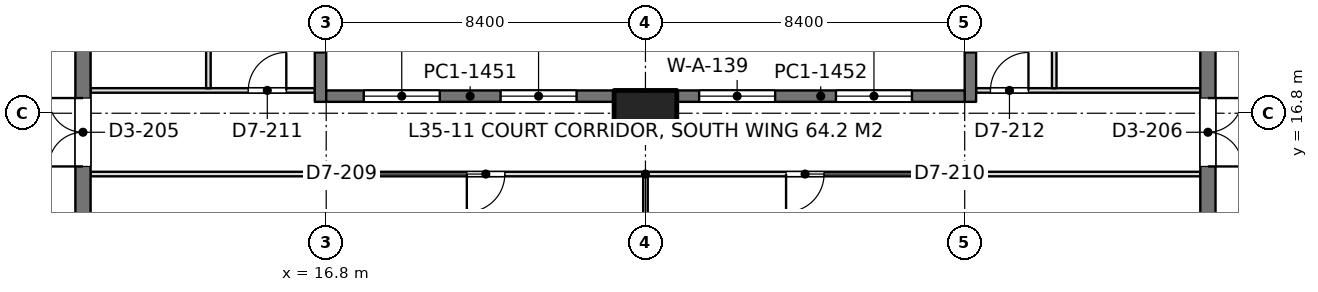
"""IFC4 building model, lengths in metres.
Left out: names, types, materials, properties, quantities, classifications, styles, units other than length and angle.
Written with IfcOpenShell. Run it as: python <this file> out.ifc"""

import sys

from ifc_helpers import new_model, si_unit, direction, frame, frame_2d, origin, origin_2d, place, context, subcontext, project, spatial, rectangle, extrude, element, fill, save


model = new_model("IFC4")
c1 = context("Model", 3, precision=1e-05, world=origin(), true_north=direction((0.0, 1.0)))
c2 = subcontext(c1, "Body", "Model", "MODEL_VIEW")
j1 = project(units=[si_unit("LENGTHUNIT", "METRE"), si_unit("PLANEANGLEUNIT", "RADIAN")], contexts=[c1])
p1 = place(None, origin())
s1 = spatial("IfcSite", under=j1, at=p1, CompositionType="ELEMENT")
p2 = place(p1, origin())
s2 = spatial("IfcBuilding", under=s1, at=p2, CompositionType="ELEMENT")
p3 = place(p2, frame((0.0, 0.0, 155.4)))
s3 = spatial("IfcBuildingStorey", under=s2, at=p3, CompositionType="ELEMENT", Elevation=155.4)
p4 = place(p3, frame((25.2, 16.8, 0.0), z_axis=(0.0, 0.0, 1.0), x_axis=(1.0, 0.0, 0.0)))
e1 = element("IfcColumn", 1, at=p4, inside=s3, PredefinedType="COLUMN", context=c2, shape_type="SweptSolid", body=[
    extrude(rectangle(XDim=1.65, YDim=1.2, at=origin_2d()), origin(), (0.0, 0.0, 1.0), 4.2),
])
p5 = place(p3, frame((10.4, 13.05, 0.0), z_axis=(0.0, 0.0, 1.0), x_axis=(0.0, 1.0, 0.0)))
e2 = element("IfcWall", 2, at=p5, inside=s3, PredefinedType="SHEAR", context=c2, shape_type="SweptSolid", body=[
    extrude(rectangle(XDim=24.3, YDim=0.4, at=frame_2d((12.15, 0.0))), origin(), (0.0, 0.0, 1.0), 4.2),
])
p6 = place(p5, frame((10.05, 0.0, 0.0)))
e3 = element("IfcOpeningElement", 3, at=p6, cuts=e2, PredefinedType="OPENING", context=c2, shape_type="SweptSolid", body=[
    extrude(rectangle(XDim=1.1, YDim=2.2, at=frame_2d((0.55, 1.1))), frame((0.0, 0.21, 0.0), z_axis=(0.0, -1.0, 0.0), x_axis=(1.0, 0.0, 0.0)), (0.0, 0.0, 1.0), 0.42),
])
p7 = place(p5, frame((12.9, 0.0, 0.0)))
e4 = element("IfcOpeningElement", 4, at=p7, cuts=e2, PredefinedType="OPENING", context=c2, shape_type="SweptSolid", body=[
    extrude(rectangle(XDim=1.1, YDim=2.2, at=frame_2d((0.55, 1.1))), frame((0.0, 0.21, 0.0), z_axis=(0.0, -1.0, 0.0), x_axis=(1.0, 0.0, 0.0)), (0.0, 0.0, 1.0), 0.42),
])
p8 = place(p5, frame((21.45, 0.0, 0.0)))
e5 = element("IfcOpeningElement", 5, at=p8, cuts=e2, PredefinedType="OPENING", context=c2, shape_type="SweptSolid", body=[
    extrude(rectangle(XDim=1.1, YDim=2.2, at=frame_2d((0.55, 1.1))), frame((0.0, 0.21, 0.0), z_axis=(0.0, -1.0, 0.0), x_axis=(1.0, 0.0, 0.0)), (0.0, 0.0, 1.0), 0.42),
])
p9 = place(p5, frame((2.35, 0.0, 0.0)))
e6 = element("IfcOpeningElement", 6, at=p9, cuts=e2, PredefinedType="OPENING", context=c2, shape_type="SweptSolid", body=[
    extrude(rectangle(XDim=1.8, YDim=2.4, at=frame_2d((0.9, 1.2))), frame((0.0, 0.21, 0.0), z_axis=(0.0, -1.0, 0.0), x_axis=(1.0, 0.0, 0.0)), (0.0, 0.0, 1.0), 0.42),
])
p10 = place(p5, frame((5.8, 0.0, 0.0)))
e7 = element("IfcOpeningElement", 7, at=p10, cuts=e2, PredefinedType="OPENING", context=c2, shape_type="SweptSolid", body=[
    extrude(rectangle(XDim=1.8, YDim=2.4, at=frame_2d((0.9, 1.2))), frame((0.0, 0.21, 0.0), z_axis=(0.0, -1.0, 0.0), x_axis=(1.0, 0.0, 0.0)), (0.0, 0.0, 1.0), 0.42),
])
p11 = place(p3, frame((40.0, 13.05, 0.0), z_axis=(0.0, 0.0, 1.0), x_axis=(0.0, 1.0, 0.0)))
e8 = element("IfcWall", 8, at=p11, inside=s3, PredefinedType="SHEAR", context=c2, shape_type="SweptSolid", body=[
    extrude(rectangle(XDim=24.3, YDim=0.4, at=frame_2d((12.15, 0.0))), origin(), (0.0, 0.0, 1.0), 4.2),
])
p12 = place(p11, frame((10.05, 0.0, 0.0)))
e9 = element("IfcOpeningElement", 9, at=p12, cuts=e8, PredefinedType="OPENING", context=c2, shape_type="SweptSolid", body=[
    extrude(rectangle(XDim=1.1, YDim=2.2, at=frame_2d((0.55, 1.1))), frame((0.0, 0.21, 0.0), z_axis=(0.0, -1.0, 0.0), x_axis=(1.0, 0.0, 0.0)), (0.0, 0.0, 1.0), 0.42),
])
p13 = place(p11, frame((12.9, 0.0, 0.0)))
e10 = element("IfcOpeningElement", 10, at=p13, cuts=e8, PredefinedType="OPENING", context=c2, shape_type="SweptSolid", body=[
    extrude(rectangle(XDim=1.1, YDim=2.2, at=frame_2d((0.55, 1.1))), frame((0.0, 0.21, 0.0), z_axis=(0.0, -1.0, 0.0), x_axis=(1.0, 0.0, 0.0)), (0.0, 0.0, 1.0), 0.42),
])
p14 = place(p11, frame((21.45, 0.0, 0.0)))
e11 = element("IfcOpeningElement", 11, at=p14, cuts=e8, PredefinedType="OPENING", context=c2, shape_type="SweptSolid", body=[
    extrude(rectangle(XDim=1.1, YDim=2.2, at=frame_2d((0.55, 1.1))), frame((0.0, 0.21, 0.0), z_axis=(0.0, -1.0, 0.0), x_axis=(1.0, 0.0, 0.0)), (0.0, 0.0, 1.0), 0.42),
])
p15 = place(p11, frame((2.35, 0.0, 0.0)))
e12 = element("IfcOpeningElement", 12, at=p15, cuts=e8, PredefinedType="OPENING", context=c2, shape_type="SweptSolid", body=[
    extrude(rectangle(XDim=1.8, YDim=2.4, at=frame_2d((0.9, 1.2))), frame((0.0, 0.21, 0.0), z_axis=(0.0, -1.0, 0.0), x_axis=(1.0, 0.0, 0.0)), (0.0, 0.0, 1.0), 0.42),
])
p16 = place(p11, frame((5.8, 0.0, 0.0)))
e13 = element("IfcOpeningElement", 13, at=p16, cuts=e8, PredefinedType="OPENING", context=c2, shape_type="SweptSolid", body=[
    extrude(rectangle(XDim=1.8, YDim=2.4, at=frame_2d((0.9, 1.2))), frame((0.0, 0.21, 0.0), z_axis=(0.0, -1.0, 0.0), x_axis=(1.0, 0.0, 0.0)), (0.0, 0.0, 1.0), 0.42),
])
p17 = place(p3, frame((16.65, 17.1, 0.0), z_axis=(0.0, 0.0, 1.0), x_axis=(0.0, 1.0, 0.0)))
e14 = element("IfcWall", 14, at=p17, inside=s3, PredefinedType="SOLIDWALL", context=c2, shape_type="SweptSolid", body=[
    extrude(rectangle(XDim=5.0, YDim=0.3, at=frame_2d((2.5, 0.0))), origin(), (0.0, 0.0, 1.0), 4.05),
])
p18 = place(p17, frame((1.3, 0.0, 0.1)))
e15 = element("IfcOpeningElement", 15, at=p18, cuts=e14, PredefinedType="OPENING", context=c2, shape_type="SweptSolid", body=[
    extrude(rectangle(XDim=2.0, YDim=3.0, at=frame_2d((1.0, 1.5))), frame((0.0, 0.16, 0.0), z_axis=(0.0, -1.0, 0.0), x_axis=(1.0, 0.0, 0.0)), (0.0, 0.0, 1.0), 0.32),
])
p19 = place(p3, frame((33.75, 17.1, 0.0), z_axis=(0.0, 0.0, 1.0), x_axis=(0.0, 1.0, 0.0)))
e16 = element("IfcWall", 16, at=p19, inside=s3, PredefinedType="SOLIDWALL", context=c2, shape_type="SweptSolid", body=[
    extrude(rectangle(XDim=5.0, YDim=0.3, at=frame_2d((2.5, 0.0))), origin(), (0.0, 0.0, 1.0), 4.05),
])
p20 = place(p19, frame((1.3, 0.0, 0.1)))
e17 = element("IfcOpeningElement", 17, at=p20, cuts=e16, PredefinedType="OPENING", context=c2, shape_type="SweptSolid", body=[
    extrude(rectangle(XDim=2.0, YDim=3.0, at=frame_2d((1.0, 1.5))), frame((0.0, 0.16, 0.0), z_axis=(0.0, -1.0, 0.0), x_axis=(1.0, 0.0, 0.0)), (0.0, 0.0, 1.0), 0.32),
])
p21 = place(p3, frame((16.8, 17.25, 0.0), z_axis=(0.0, 0.0, 1.0), x_axis=(1.0, 0.0, 0.0)))
e18 = element("IfcWall", 18, at=p21, inside=s3, PredefinedType="SOLIDWALL", context=c2, shape_type="SweptSolid", body=[
    extrude(rectangle(XDim=7.575, YDim=0.3, at=frame_2d((3.788, 0.0))), origin(), (0.0, 0.0, 1.0), 4.05),
])
p22 = place(p21, frame((0.988, 0.0, 0.1)))
e19 = element("IfcOpeningElement", 19, at=p22, cuts=e18, PredefinedType="OPENING", context=c2, shape_type="SweptSolid", body=[
    extrude(rectangle(XDim=2.0, YDim=3.0, at=frame_2d((1.0, 1.5))), frame((0.0, 0.16, 0.0), z_axis=(0.0, -1.0, 0.0), x_axis=(1.0, 0.0, 0.0)), (0.0, 0.0, 1.0), 0.32),
])
p23 = place(p21, frame((4.587, 0.0, 0.1)))
e20 = element("IfcOpeningElement", 20, at=p23, cuts=e18, PredefinedType="OPENING", context=c2, shape_type="SweptSolid", body=[
    extrude(rectangle(XDim=2.0, YDim=3.0, at=frame_2d((1.0, 1.5))), frame((0.0, 0.16, 0.0), z_axis=(0.0, -1.0, 0.0), x_axis=(1.0, 0.0, 0.0)), (0.0, 0.0, 1.0), 0.32),
])
p24 = place(p3, frame((26.025, 17.25, 0.0), z_axis=(0.0, 0.0, 1.0), x_axis=(1.0, 0.0, 0.0)))
e21 = element("IfcWall", 21, at=p24, inside=s3, PredefinedType="SOLIDWALL", context=c2, shape_type="SweptSolid", body=[
    extrude(rectangle(XDim=7.575, YDim=0.3, at=frame_2d((3.788, 0.0))), origin(), (0.0, 0.0, 1.0), 4.05),
])
p25 = place(p24, frame((0.587, 0.0, 0.1)))
e22 = element("IfcOpeningElement", 22, at=p25, cuts=e21, PredefinedType="OPENING", context=c2, shape_type="SweptSolid", body=[
    extrude(rectangle(XDim=2.0, YDim=3.0, at=frame_2d((1.0, 1.5))), frame((0.0, 0.16, 0.0), z_axis=(0.0, -1.0, 0.0), x_axis=(1.0, 0.0, 0.0)), (0.0, 0.0, 1.0), 0.32),
])
p26 = place(p24, frame((4.188, 0.0, 0.1)))
e23 = element("IfcOpeningElement", 23, at=p26, cuts=e21, PredefinedType="OPENING", context=c2, shape_type="SweptSolid", body=[
    extrude(rectangle(XDim=2.0, YDim=3.0, at=frame_2d((1.0, 1.5))), frame((0.0, 0.16, 0.0), z_axis=(0.0, -1.0, 0.0), x_axis=(1.0, 0.0, 0.0)), (0.0, 0.0, 1.0), 0.32),
])
p27 = place(p3, frame((10.598, 17.4, 0.0), z_axis=(0.0, 0.0, 1.0), x_axis=(1.0, 0.0, 0.0)))
e24 = element("IfcWall", 24, at=p27, inside=s3, PredefinedType="PARTITIONING", context=c2, shape_type="SweptSolid", body=[
    extrude(rectangle(XDim=5.904, YDim=0.12, at=frame_2d((2.952, 0.0))), origin(), (0.0, 0.0, 1.0), 3.55),
])
p28 = place(p27, frame((4.152, 0.0, 0.0)))
e25 = element("IfcOpeningElement", 25, at=p28, cuts=e24, PredefinedType="OPENING", context=c2, shape_type="SweptSolid", body=[
    extrude(rectangle(XDim=1.0, YDim=2.4, at=frame_2d((0.5, 1.2))), frame((0.0, 0.07, 0.0), z_axis=(0.0, -1.0, 0.0), x_axis=(1.0, 0.0, 0.0)), (0.0, 0.0, 1.0), 0.14),
])
p29 = place(p3, frame((13.7, 17.458, 0.0), z_axis=(0.0, 0.0, 1.0), x_axis=(0.0, 1.0, 0.0)))
e26 = element("IfcWall", 26, at=p29, inside=s3, PredefinedType="PARTITIONING", context=c2, shape_type="SweptSolid", body=[
    extrude(rectangle(XDim=4.644, YDim=0.12, at=frame_2d((2.322, 0.0))), origin(), (0.0, 0.0, 1.0), 3.6),
])
p30 = place(p3, frame((33.898, 17.4, 0.0), z_axis=(0.0, 0.0, 1.0), x_axis=(1.0, 0.0, 0.0)))
e27 = element("IfcWall", 27, at=p30, inside=s3, PredefinedType="PARTITIONING", context=c2, shape_type="SweptSolid", body=[
    extrude(rectangle(XDim=5.904, YDim=0.12, at=frame_2d((2.952, 0.0))), origin(), (0.0, 0.0, 1.0), 3.55),
])
p31 = place(p30, frame((0.38, 0.0, 0.0)))
e28 = element("IfcOpeningElement", 28, at=p31, cuts=e27, PredefinedType="OPENING", context=c2, shape_type="SweptSolid", body=[
    extrude(rectangle(XDim=1.0, YDim=2.4, at=frame_2d((0.5, 1.2))), frame((0.0, 0.07, 0.0), z_axis=(0.0, -1.0, 0.0), x_axis=(1.0, 0.0, 0.0)), (0.0, 0.0, 1.0), 0.14),
])
p32 = place(p3, frame((35.956, 17.458, 0.0), z_axis=(0.0, 0.0, 1.0), x_axis=(0.0, 1.0, 0.0)))
e29 = element("IfcWall", 29, at=p32, inside=s3, PredefinedType="PARTITIONING", context=c2, shape_type="SweptSolid", body=[
    extrude(rectangle(XDim=4.644, YDim=0.12, at=frame_2d((2.322, 0.0))), origin(), (0.0, 0.0, 1.0), 3.6),
])
for number, where, z_axis, x_axis in (
    (30, (10.598, 15.2, 0.0), (0.0, 0.0, 1.0), (1.0, 0.0, 0.0)),
    (31, (33.598, 15.2, 0.0), (0.0, 0.0, 1.0), (1.0, 0.0, 0.0)),
):
    element("IfcWall", number, at=place(p3, frame(where, z_axis=z_axis, x_axis=x_axis)), inside=s3, PredefinedType="PARTITIONING", context=c2, shape_type="SweptSolid", body=[
        extrude(rectangle(XDim=6.204, YDim=0.12, at=frame_2d((3.102, 0.0))), origin(), (0.0, 0.0, 1.0), 3.55),
    ])
p33 = place(p3, frame((25.2, 12.658, 0.0), z_axis=(0.0, 0.0, 1.0), x_axis=(0.0, 1.0, 0.0)))
e32 = element("IfcWall", 32, at=p33, inside=s3, PredefinedType="PARTITIONING", context=c2, shape_type="SweptSolid", body=[
    extrude(rectangle(XDim=2.484, YDim=0.12, at=frame_2d((1.242, 0.0))), origin(), (0.0, 0.0, 1.0), 3.55),
])
p34 = place(p3, frame((16.798, 15.2, 0.0), z_axis=(0.0, 0.0, 1.0), x_axis=(1.0, 0.0, 0.0)))
e33 = element("IfcWall", 33, at=p34, inside=s3, PredefinedType="PARTITIONING", context=c2, shape_type="SweptSolid", body=[
    extrude(rectangle(XDim=16.804, YDim=0.12, at=frame_2d((8.402, 0.0))), origin(), (0.0, 0.0, 1.0), 3.55),
])
p35 = place(p34, frame((3.702, 0.0, 0.0)))
e34 = element("IfcOpeningElement", 34, at=p35, cuts=e33, PredefinedType="OPENING", context=c2, shape_type="SweptSolid", body=[
    extrude(rectangle(XDim=1.0, YDim=2.4, at=frame_2d((0.5, 1.2))), frame((0.0, 0.07, 0.0), z_axis=(0.0, -1.0, 0.0), x_axis=(1.0, 0.0, 0.0)), (0.0, 0.0, 1.0), 0.14),
])
p36 = place(p34, frame((12.102, 0.0, 0.0)))
e35 = element("IfcOpeningElement", 35, at=p36, cuts=e33, PredefinedType="OPENING", context=c2, shape_type="SweptSolid", body=[
    extrude(rectangle(XDim=1.0, YDim=2.4, at=frame_2d((0.5, 1.2))), frame((0.0, 0.07, 0.0), z_axis=(0.0, -1.0, 0.0), x_axis=(1.0, 0.0, 0.0)), (0.0, 0.0, 1.0), 0.14),
])
p37 = place(p22, origin())
e36 = element("IfcWindow", 36, at=p37, inside=s3, PartitioningType="SINGLE_PANEL", PredefinedType="WINDOW", context=c2, shape_type="SweptSolid", body=[
    extrude(rectangle(XDim=2.0, YDim=3.0, at=frame_2d((1.0, 1.5))), frame((0.0, 0.03, 0.0), z_axis=(0.0, -1.0, 0.0), x_axis=(1.0, 0.0, 0.0)), (0.0, 0.0, 1.0), 0.06),
])
fill(e19, e36)
p38 = place(p23, origin())
e37 = element("IfcWindow", 37, at=p38, inside=s3, PartitioningType="SINGLE_PANEL", PredefinedType="WINDOW", context=c2, shape_type="SweptSolid", body=[
    extrude(rectangle(XDim=2.0, YDim=3.0, at=frame_2d((1.0, 1.5))), frame((0.0, 0.03, 0.0), z_axis=(0.0, -1.0, 0.0), x_axis=(1.0, 0.0, 0.0)), (0.0, 0.0, 1.0), 0.06),
])
fill(e20, e37)
p39 = place(p25, origin())
e38 = element("IfcWindow", 38, at=p39, inside=s3, PartitioningType="SINGLE_PANEL", PredefinedType="WINDOW", context=c2, shape_type="SweptSolid", body=[
    extrude(rectangle(XDim=2.0, YDim=3.0, at=frame_2d((1.0, 1.5))), frame((0.0, 0.03, 0.0), z_axis=(0.0, -1.0, 0.0), x_axis=(1.0, 0.0, 0.0)), (0.0, 0.0, 1.0), 0.06),
])
fill(e22, e38)
p40 = place(p26, origin())
e39 = element("IfcWindow", 39, at=p40, inside=s3, PartitioningType="SINGLE_PANEL", PredefinedType="WINDOW", context=c2, shape_type="SweptSolid", body=[
    extrude(rectangle(XDim=2.0, YDim=3.0, at=frame_2d((1.0, 1.5))), frame((0.0, 0.03, 0.0), z_axis=(0.0, -1.0, 0.0), x_axis=(1.0, 0.0, 0.0)), (0.0, 0.0, 1.0), 0.06),
])
fill(e23, e39)
p41 = place(p9, origin())
e40 = element("IfcDoor", 40, at=p41, inside=s3, OperationType="DOUBLE_DOOR_SINGLE_SWING", PredefinedType="DOOR", context=c2, shape_type="SweptSolid", body=[
    extrude(rectangle(XDim=1.8, YDim=2.4, at=frame_2d((0.9, 1.2))), frame((0.0, 0.025, 0.0), z_axis=(0.0, -1.0, 0.0), x_axis=(1.0, 0.0, 0.0)), (0.0, 0.0, 1.0), 0.05),
])
fill(e6, e40)
p42 = place(p15, frame((1.8, 0.0, 0.0), z_axis=(0.0, 0.0, 1.0), x_axis=(-1.0, 0.0, 0.0)))
e41 = element("IfcDoor", 41, at=p42, inside=s3, OperationType="DOUBLE_DOOR_SINGLE_SWING", PredefinedType="DOOR", context=c2, shape_type="SweptSolid", body=[
    extrude(rectangle(XDim=1.8, YDim=2.4, at=frame_2d((0.9, 1.2))), frame((0.0, 0.025, 0.0), z_axis=(0.0, -1.0, 0.0), x_axis=(1.0, 0.0, 0.0)), (0.0, 0.0, 1.0), 0.05),
])
fill(e12, e41)
p43 = place(p28, origin())
e42 = element("IfcDoor", 42, at=p43, inside=s3, OperationType="SINGLE_SWING_RIGHT", PredefinedType="DOOR", context=c2, shape_type="SweptSolid", body=[
    extrude(rectangle(XDim=1.0, YDim=2.4, at=frame_2d((0.5, 1.2))), frame((0.0, 0.025, 0.0), z_axis=(0.0, -1.0, 0.0), x_axis=(1.0, 0.0, 0.0)), (0.0, 0.0, 1.0), 0.05),
])
fill(e25, e42)
p44 = place(p31, origin())
e43 = element("IfcDoor", 43, at=p44, inside=s3, OperationType="SINGLE_SWING_RIGHT", PredefinedType="DOOR", context=c2, shape_type="SweptSolid", body=[
    extrude(rectangle(XDim=1.0, YDim=2.4, at=frame_2d((0.5, 1.2))), frame((0.0, 0.025, 0.0), z_axis=(0.0, -1.0, 0.0), x_axis=(1.0, 0.0, 0.0)), (0.0, 0.0, 1.0), 0.05),
])
fill(e28, e43)
p45 = place(p35, frame((1.0, 0.0, 0.0), z_axis=(0.0, 0.0, 1.0), x_axis=(-1.0, 0.0, 0.0)))
e44 = element("IfcDoor", 44, at=p45, inside=s3, OperationType="SINGLE_SWING_RIGHT", PredefinedType="DOOR", context=c2, shape_type="SweptSolid", body=[
    extrude(rectangle(XDim=1.0, YDim=2.4, at=frame_2d((0.5, 1.2))), frame((0.0, 0.025, 0.0), z_axis=(0.0, -1.0, 0.0), x_axis=(1.0, 0.0, 0.0)), (0.0, 0.0, 1.0), 0.05),
])
fill(e34, e44)
p46 = place(p36, frame((1.0, 0.0, 0.0), z_axis=(0.0, 0.0, 1.0), x_axis=(-1.0, 0.0, 0.0)))
e45 = element("IfcDoor", 45, at=p46, inside=s3, OperationType="SINGLE_SWING_RIGHT", PredefinedType="DOOR", context=c2, shape_type="SweptSolid", body=[
    extrude(rectangle(XDim=1.0, YDim=2.4, at=frame_2d((0.5, 1.2))), frame((0.0, 0.025, 0.0), z_axis=(0.0, -1.0, 0.0), x_axis=(1.0, 0.0, 0.0)), (0.0, 0.0, 1.0), 0.05),
])
fill(e35, e45)
save(model, sys.argv[1])
